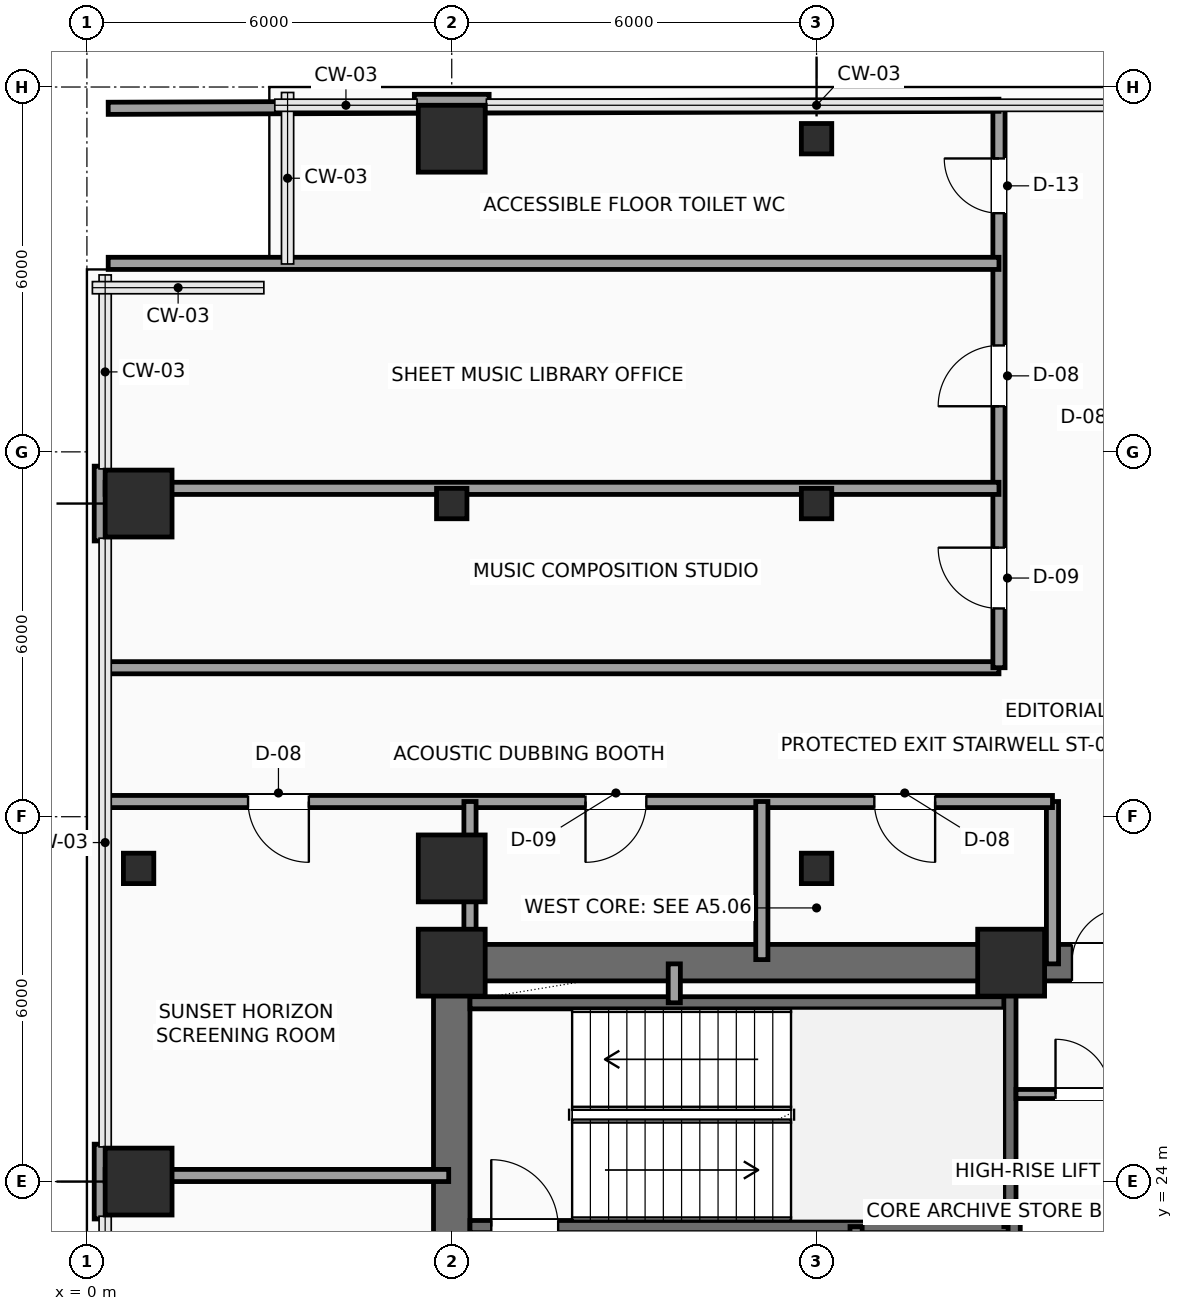
"""IFC4 building model, lengths in metres.
Left out: names, types, materials, properties, quantities, classifications, styles, units other than length and angle.
Written with IfcOpenShell. Run it as: python <this file> out.ifc"""

import sys

from ifc_helpers import new_model, si_unit, direction, frame, frame_2d, origin, origin_2d, place, context, subcontext, project, spatial, rectangle, hollow_rectangle, extrude, element, fill, save


model = new_model("IFC4")
c1 = context("Model", 3, precision=1e-05, world=origin(), true_north=direction((0.0, 1.0)))
c2 = subcontext(c1, "Body", "Model", "MODEL_VIEW")
j1 = project(units=[si_unit("LENGTHUNIT", "METRE"), si_unit("PLANEANGLEUNIT", "RADIAN")], contexts=[c1])
p1 = place(None, origin())
s1 = spatial("IfcSite", under=j1, at=p1, CompositionType="ELEMENT")
p2 = place(p1, origin())
s2 = spatial("IfcBuilding", under=s1, at=p2, CompositionType="ELEMENT")
p3 = place(p2, frame((0.0, 0.0, 115.65)))
s3 = spatial("IfcBuildingStorey", under=s2, at=p3, CompositionType="ELEMENT", Elevation=115.65)
for number, where, z_axis, x_axis in (
    (1, (6.0, 27.6, 0.0), (0.0, 0.0, 1.0), (1.0, 0.0, 0.0)),
    (2, (15.2, 27.6, 0.0), (0.0, 0.0, 1.0), (1.0, 0.0, 0.0)),
    (3, (0.85, 24.0, 0.0), (0.0, 0.0, 1.0), (1.0, 0.0, 0.0)),
):
    element("IfcColumn", number, at=place(p3, frame(where, z_axis=z_axis, x_axis=x_axis)), inside=s3, PredefinedType="COLUMN", context=c2, shape_type="SweptSolid", body=[
        extrude(rectangle(XDim=1.1, YDim=1.1, at=origin_2d()), origin(), (0.0, 0.0, 1.0), 3.75),
    ])
p4 = place(p3, frame((0.85, 29.15, 0.0), z_axis=(0.0, 0.0, 1.0), x_axis=(1.0, 0.0, 0.0)))
e4 = element("IfcColumn", 4, at=p4, inside=s3, PredefinedType="COLUMN", context=c2, shape_type="SweptSolid", body=[
    extrude(hollow_rectangle(XDim=0.5, YDim=0.5, WallThickness=0.025, InnerFilletRadius=0.025, OuterFilletRadius=0.04, at=origin_2d()), origin(), (0.0, 0.0, 1.0), 3.75),
])
for number, where, z_axis, x_axis in (
    (5, (0.85, 35.15, 0.0), (0.0, 0.0, 1.0), (1.0, 0.0, 0.0)),
    (6, (6.0, 29.15, 0.0), (0.0, 0.0, 1.0), (1.0, 0.0, 0.0)),
):
    element("IfcColumn", number, at=place(p3, frame(where, z_axis=z_axis, x_axis=x_axis)), inside=s3, PredefinedType="COLUMN", context=c2, shape_type="SweptSolid", body=[
        extrude(rectangle(XDim=1.1, YDim=1.1, at=origin_2d()), origin(), (0.0, 0.0, 1.0), 3.75),
    ])
p5 = place(p3, frame((6.0, 35.15, 0.0), z_axis=(0.0, 0.0, 1.0), x_axis=(1.0, 0.0, 0.0)))
e7 = element("IfcColumn", 7, at=p5, inside=s3, PredefinedType="COLUMN", context=c2, shape_type="SweptSolid", body=[
    extrude(hollow_rectangle(XDim=0.5, YDim=0.5, WallThickness=0.025, InnerFilletRadius=0.025, OuterFilletRadius=0.04, at=origin_2d()), origin(), (0.0, 0.0, 1.0), 3.75),
])
p6 = place(p3, frame((6.0, 41.15, 0.0), z_axis=(0.0, 0.0, 1.0), x_axis=(1.0, 0.0, 0.0)))
e8 = element("IfcColumn", 8, at=p6, inside=s3, PredefinedType="COLUMN", context=c2, shape_type="SweptSolid", body=[
    extrude(rectangle(XDim=1.1, YDim=1.1, at=origin_2d()), origin(), (0.0, 0.0, 1.0), 3.75),
])
for number, where, z_axis, x_axis in (
    (9, (12.0, 29.15, 0.0), (0.0, 0.0, 1.0), (1.0, 0.0, 0.0)),
    (10, (12.0, 35.15, 0.0), (0.0, 0.0, 1.0), (1.0, 0.0, 0.0)),
    (11, (12.0, 41.15, 0.0), (0.0, 0.0, 1.0), (1.0, 0.0, 0.0)),
):
    element("IfcColumn", number, at=place(p3, frame(where, z_axis=z_axis, x_axis=x_axis)), inside=s3, PredefinedType="COLUMN", context=c2, shape_type="SweptSolid", body=[
        extrude(hollow_rectangle(XDim=0.5, YDim=0.5, WallThickness=0.025, InnerFilletRadius=0.025, OuterFilletRadius=0.04, at=origin_2d()), origin(), (0.0, 0.0, 1.0), 3.75),
    ])
for number, where, z_axis, x_axis in (
    (12, (0.24, 23.385, 0.0), (0.0, 0.0, 1.0), (0.0, 1.0, 0.0)),
    (13, (0.24, 34.535, 0.0), (0.0, 0.0, 1.0), (0.0, 1.0, 0.0)),
    (14, (5.385, 41.76, 0.0), (0.0, 0.0, 1.0), (1.0, 0.0, 0.0)),
):
    element("IfcWall", number, at=place(p3, frame(where, z_axis=z_axis, x_axis=x_axis)), inside=s3, PredefinedType="SOLIDWALL", context=c2, shape_type="SweptSolid", body=[
        extrude(rectangle(XDim=1.23, YDim=0.24, at=frame_2d((0.615, 0.0))), origin(), (0.0, 0.0, 1.0), 3.525),
    ])
p7 = place(p3, frame((6.0, 27.6, 0.0), z_axis=(0.0, 0.0, 1.0), x_axis=(1.0, 0.0, 0.0)))
e15 = element("IfcWall", 15, at=p7, inside=s3, PredefinedType="SHEAR", context=c2, shape_type="SweptSolid", body=[
    extrude(rectangle(XDim=12.0, YDim=0.6, at=frame_2d((6.0, 0.0))), origin(), (0.0, 0.0, 1.0), 3.525),
])
p8 = place(p7, frame((10.2, 0.0, 0.0)))
e16 = element("IfcOpeningElement", 16, at=p8, cuts=e15, PredefinedType="OPENING", context=c2, shape_type="SweptSolid", body=[
    extrude(rectangle(XDim=0.9, YDim=2.15, at=frame_2d((0.45, 1.075))), frame((0.0, 0.31, 0.0), z_axis=(0.0, -1.0, 0.0), x_axis=(1.0, 0.0, 0.0)), (0.0, 0.0, 1.0), 0.62),
])
p9 = place(p3, frame((6.0, 18.0, 0.0), z_axis=(0.0, 0.0, 1.0), x_axis=(0.0, 1.0, 0.0)))
e17 = element("IfcWall", 17, at=p9, inside=s3, PredefinedType="SHEAR", context=c2, shape_type="SweptSolid", body=[
    extrude(rectangle(XDim=9.6, YDim=0.6, at=frame_2d((4.8, 0.0))), origin(), (0.0, 0.0, 1.0), 3.525),
])
p10 = place(p3, frame((6.3, 23.26, 0.0), z_axis=(0.0, 0.0, 1.0), x_axis=(1.0, 0.0, 0.0)))
e18 = element("IfcWall", 18, at=p10, inside=s3, PredefinedType="SHEAR", context=c2, shape_type="SweptSolid", body=[
    extrude(rectangle(XDim=8.88, YDim=0.2, at=frame_2d((4.44, 0.0))), origin(), (0.0, 0.0, 1.0), 3.525),
])
p11 = place(p10, frame((0.35, 0.0, 0.0)))
e19 = element("IfcOpeningElement", 19, at=p11, cuts=e18, PredefinedType="OPENING", context=c2, shape_type="SweptSolid", body=[
    extrude(rectangle(XDim=1.1, YDim=2.2, at=frame_2d((0.55, 1.1))), frame((0.0, 0.11, 0.0), z_axis=(0.0, -1.0, 0.0), x_axis=(1.0, 0.0, 0.0)), (0.0, 0.0, 1.0), 0.22),
])
p12 = place(p3, frame((6.3, 26.94, 0.0), z_axis=(0.0, 0.0, 1.0), x_axis=(1.0, 0.0, 0.0)))
e20 = element("IfcWall", 20, at=p12, inside=s3, PredefinedType="SHEAR", context=c2, shape_type="SweptSolid", body=[
    extrude(rectangle(XDim=8.88, YDim=0.2, at=frame_2d((4.44, 0.0))), origin(), (0.0, 0.0, 1.0), 3.525),
])
p13 = place(p3, frame((15.18, 23.26, 0.0), z_axis=(0.0, 0.0, 1.0), x_axis=(0.0, 1.0, 0.0)))
e21 = element("IfcWall", 21, at=p13, inside=s3, PredefinedType="SHEAR", context=c2, shape_type="SweptSolid", body=[
    extrude(rectangle(XDim=4.04, YDim=0.2, at=frame_2d((2.02, 0.0))), origin(), (0.0, 0.0, 1.0), 3.525),
])
p14 = place(p3, frame((12.65, 20.42, 0.0), z_axis=(0.0, 0.0, 1.0), x_axis=(0.0, 1.0, 0.0)))
e22 = element("IfcWall", 22, at=p14, inside=s3, PredefinedType="SHEAR", context=c2, shape_type="SweptSolid", body=[
    extrude(rectangle(XDim=2.84, YDim=0.2, at=frame_2d((1.42, 0.0))), origin(), (0.0, 0.0, 1.0), 3.525),
])
p15 = place(p14, frame((0.9, 0.0, 0.0)))
e23 = element("IfcOpeningElement", 23, at=p15, cuts=e22, PredefinedType="OPENING", context=c2, shape_type="SweptSolid", body=[
    extrude(rectangle(XDim=0.9, YDim=2.15, at=frame_2d((0.45, 1.075))), frame((0.0, 0.11, 0.0), z_axis=(0.0, -1.0, 0.0), x_axis=(1.0, 0.0, 0.0)), (0.0, 0.0, 1.0), 0.22),
])
p16 = place(p3, frame((9.66, 26.94, 0.0), z_axis=(0.0, 0.0, 1.0), x_axis=(0.0, 1.0, 0.0)))
e24 = element("IfcWall", 24, at=p16, inside=s3, PredefinedType="SOLIDWALL", context=c2, shape_type="SweptSolid", body=[
    extrude(rectangle(XDim=0.64, YDim=0.2, at=frame_2d((0.32, 0.0))), origin(), (0.0, 0.0, 1.0), 3.525),
])
p17 = place(p3, frame((15.25, 18.25, 0.0), z_axis=(0.0, 0.0, 1.0), x_axis=(0.0, 1.0, 0.0)))
e25 = element("IfcWall", 25, at=p17, inside=s3, PredefinedType="SHEAR", context=c2, shape_type="SweptSolid", body=[
    extrude(rectangle(XDim=5.2, YDim=0.2, at=frame_2d((2.6, 0.0))), origin(), (0.0, 0.0, 1.0), 3.525),
])
p18 = place(p3, frame((15.25, 23.45, 0.0), z_axis=(0.0, 0.0, 1.0), x_axis=(1.0, 0.0, 0.0)))
e26 = element("IfcWall", 26, at=p18, inside=s3, PredefinedType="SHEAR", context=c2, shape_type="SweptSolid", body=[
    extrude(rectangle(XDim=2.45, YDim=0.2, at=frame_2d((1.225, 0.0))), origin(), (0.0, 0.0, 1.0), 3.525),
])
p19 = place(p3, frame((15.28, 25.44, 0.0), z_axis=(0.0, 0.0, 1.0), x_axis=(1.0, 0.0, 0.0)))
e27 = element("IfcWall", 27, at=p19, inside=s3, PredefinedType="PARTITIONING", context=c2, shape_type="SweptSolid", body=[
    extrude(rectangle(XDim=2.42, YDim=0.15, at=frame_2d((1.21, 0.0))), origin(), (0.0, 0.0, 1.0), 3.525),
])
p20 = place(p19, frame((0.65, 0.0, 0.0)))
e28 = element("IfcOpeningElement", 28, at=p20, cuts=e27, PredefinedType="OPENING", context=c2, shape_type="SweptSolid", body=[
    extrude(rectangle(XDim=0.9, YDim=2.15, at=frame_2d((0.45, 1.075))), frame((0.0, 0.085, 0.0), z_axis=(0.0, -1.0, 0.0), x_axis=(1.0, 0.0, 0.0)), (0.0, 0.0, 1.0), 0.17),
])
p21 = place(p3, frame((15.88, 27.58, 0.0), z_axis=(0.0, 0.0, 1.0), x_axis=(0.0, 1.0, 0.0)))
e29 = element("IfcWall", 29, at=p21, inside=s3, PredefinedType="SOLIDWALL", context=c2, shape_type="SweptSolid", body=[
    extrude(rectangle(XDim=2.67, YDim=0.2, at=frame_2d((1.335, 0.0))), origin(), (0.0, 0.0, 1.0), 3.525),
])
p22 = place(p3, frame((15.88, 30.25, 0.0), z_axis=(0.0, 0.0, 1.0), x_axis=(-1.0, 0.0, 0.0)))
e30 = element("IfcWall", 30, at=p22, inside=s3, PredefinedType="SOLIDWALL", context=c2, shape_type="SweptSolid", body=[
    extrude(rectangle(XDim=15.58, YDim=0.2, at=frame_2d((7.79, 0.0))), origin(), (0.0, 0.0, 1.0), 3.525),
])
p23 = place(p22, frame((12.23, 0.0, 0.0)))
e31 = element("IfcOpeningElement", 31, at=p23, cuts=e30, PredefinedType="OPENING", context=c2, shape_type="SweptSolid", body=[
    extrude(rectangle(XDim=1.0, YDim=2.2, at=frame_2d((0.5, 1.1))), frame((0.0, 0.11, 0.0), z_axis=(0.0, -1.0, 0.0), x_axis=(1.0, 0.0, 0.0)), (0.0, 0.0, 1.0), 0.22),
])
p24 = place(p22, frame((6.68, 0.0, 0.0)))
e32 = element("IfcOpeningElement", 32, at=p24, cuts=e30, PredefinedType="OPENING", context=c2, shape_type="SweptSolid", body=[
    extrude(rectangle(XDim=1.0, YDim=2.2, at=frame_2d((0.5, 1.1))), frame((0.0, 0.11, 0.0), z_axis=(0.0, -1.0, 0.0), x_axis=(1.0, 0.0, 0.0)), (0.0, 0.0, 1.0), 0.22),
])
p25 = place(p22, frame((1.93, 0.0, 0.0)))
e33 = element("IfcOpeningElement", 33, at=p25, cuts=e30, PredefinedType="OPENING", context=c2, shape_type="SweptSolid", body=[
    extrude(rectangle(XDim=1.0, YDim=2.2, at=frame_2d((0.5, 1.1))), frame((0.0, 0.11, 0.0), z_axis=(0.0, -1.0, 0.0), x_axis=(1.0, 0.0, 0.0)), (0.0, 0.0, 1.0), 0.22),
])
p26 = place(p3, frame((0.3, 32.45, 0.0), z_axis=(0.0, 0.0, 1.0), x_axis=(1.0, 0.0, 0.0)))
e34 = element("IfcWall", 34, at=p26, inside=s3, PredefinedType="SOLIDWALL", context=c2, shape_type="SweptSolid", body=[
    extrude(rectangle(XDim=14.7, YDim=0.2, at=frame_2d((7.35, 0.0))), origin(), (0.0, 0.0, 1.0), 3.525),
])
p27 = place(p3, frame((15.0, 32.45, 0.0), z_axis=(0.0, 0.0, 1.0), x_axis=(0.0, 1.0, 0.0)))
e35 = element("IfcWall", 35, at=p27, inside=s3, PredefinedType="SOLIDWALL", context=c2, shape_type="SweptSolid", body=[
    extrude(rectangle(XDim=9.25, YDim=0.2, at=frame_2d((4.625, 0.0))), origin(), (0.0, 0.0, 1.0), 3.525),
])
p28 = place(p27, frame((0.975, 0.0, 0.0)))
e36 = element("IfcOpeningElement", 36, at=p28, cuts=e35, PredefinedType="OPENING", context=c2, shape_type="SweptSolid", body=[
    extrude(rectangle(XDim=1.0, YDim=2.2, at=frame_2d((0.5, 1.1))), frame((0.0, 0.11, 0.0), z_axis=(0.0, -1.0, 0.0), x_axis=(1.0, 0.0, 0.0)), (0.0, 0.0, 1.0), 0.22),
])
p29 = place(p27, frame((4.3, 0.0, 0.0)))
e37 = element("IfcOpeningElement", 37, at=p29, cuts=e35, PredefinedType="OPENING", context=c2, shape_type="SweptSolid", body=[
    extrude(rectangle(XDim=1.0, YDim=2.2, at=frame_2d((0.5, 1.1))), frame((0.0, 0.11, 0.0), z_axis=(0.0, -1.0, 0.0), x_axis=(1.0, 0.0, 0.0)), (0.0, 0.0, 1.0), 0.22),
])
p30 = place(p27, frame((7.475, 0.0, 0.0)))
e38 = element("IfcOpeningElement", 38, at=p30, cuts=e35, PredefinedType="OPENING", context=c2, shape_type="SweptSolid", body=[
    extrude(rectangle(XDim=0.9, YDim=2.1, at=frame_2d((0.45, 1.05))), frame((0.0, 0.11, 0.0), z_axis=(0.0, -1.0, 0.0), x_axis=(1.0, 0.0, 0.0)), (0.0, 0.0, 1.0), 0.22),
])
p31 = place(p3, frame((0.3, 24.1, 0.0), z_axis=(0.0, 0.0, 1.0), x_axis=(1.0, 0.0, 0.0)))
e39 = element("IfcWall", 39, at=p31, inside=s3, PredefinedType="PARTITIONING", context=c2, shape_type="SweptSolid", body=[
    extrude(rectangle(XDim=5.65, YDim=0.2, at=frame_2d((2.825, 0.0))), origin(), (0.0, 0.0, 1.0), 3.525),
])
p32 = place(p3, frame((6.3, 27.65, 0.0), z_axis=(0.0, 0.0, 1.0), x_axis=(0.0, 1.0, 0.0)))
e40 = element("IfcWall", 40, at=p32, inside=s3, PredefinedType="PARTITIONING", context=c2, shape_type="SweptSolid", body=[
    extrude(rectangle(XDim=2.6, YDim=0.2, at=frame_2d((1.3, 0.0))), origin(), (0.0, 0.0, 1.0), 3.017),
])
p33 = place(p3, frame((11.1, 27.65, 0.0), z_axis=(0.0, 0.0, 1.0), x_axis=(0.0, 1.0, 0.0)))
e41 = element("IfcWall", 41, at=p33, inside=s3, PredefinedType="PARTITIONING", context=c2, shape_type="SweptSolid", body=[
    extrude(rectangle(XDim=2.6, YDim=0.2, at=frame_2d((1.3, 0.0))), origin(), (0.0, 0.0, 1.0), 3.525),
])
p34 = place(p3, frame((0.3, 35.4, 0.0), z_axis=(0.0, 0.0, 1.0), x_axis=(1.0, 0.0, 0.0)))
e42 = element("IfcWall", 42, at=p34, inside=s3, PredefinedType="PARTITIONING", context=c2, shape_type="SweptSolid", body=[
    extrude(rectangle(XDim=14.7, YDim=0.2, at=frame_2d((7.35, 0.0))), origin(), (0.0, 0.0, 1.0), 3.017),
])
p35 = place(p3, frame((0.35, 39.1, 0.0), z_axis=(0.0, 0.0, 1.0), x_axis=(1.0, 0.0, 0.0)))
e43 = element("IfcWall", 43, at=p35, inside=s3, PredefinedType="PARTITIONING", context=c2, shape_type="SweptSolid", body=[
    extrude(rectangle(XDim=14.65, YDim=0.2, at=frame_2d((7.325, 0.0))), origin(), (0.0, 0.0, 1.0), 3.525),
])
p36 = place(p3, frame((0.35, 41.65, 0.0), z_axis=(0.0, 0.0, 1.0), x_axis=(0.999994073761, 0.003442737683, 0.0)))
e44 = element("IfcWall", 44, at=p36, inside=s3, PredefinedType="PARTITIONING", context=c2, shape_type="SweptSolid", body=[
    extrude(rectangle(XDim=5.035, YDim=0.2, at=frame_2d((2.518, 0.0))), origin(), (0.0, 0.0, 1.0), 3.525),
])
p37 = place(p3, frame((6.615, 41.671, 0.0), z_axis=(0.0, 0.0, 1.0), x_axis=(0.999994197557, 0.003406589638, 0.0)))
e45 = element("IfcWall", 45, at=p37, inside=s3, PredefinedType="PARTITIONING", context=c2, shape_type="SweptSolid", body=[
    extrude(rectangle(XDim=8.385, YDim=0.2, at=frame_2d((4.192, 0.0))), origin(), (0.0, 0.0, 1.0), 3.525),
])
p38 = place(p8, origin())
e46 = element("IfcDoor", 46, at=p38, inside=s3, OperationType="SINGLE_SWING_RIGHT", PredefinedType="DOOR", context=c2, shape_type="SweptSolid", body=[
    extrude(rectangle(XDim=0.9, YDim=2.15, at=frame_2d((0.45, 1.075))), frame((0.0, 0.025, 0.0), z_axis=(0.0, -1.0, 0.0), x_axis=(1.0, 0.0, 0.0)), (0.0, 0.0, 1.0), 0.05),
])
fill(e16, e46)
p39 = place(p11, origin())
e47 = element("IfcDoor", 47, at=p39, inside=s3, OperationType="SINGLE_SWING_LEFT", PredefinedType="DOOR", context=c2, shape_type="SweptSolid", body=[
    extrude(rectangle(XDim=1.1, YDim=2.2, at=frame_2d((0.55, 1.1))), frame((0.0, 0.025, 0.0), z_axis=(0.0, -1.0, 0.0), x_axis=(1.0, 0.0, 0.0)), (0.0, 0.0, 1.0), 0.05),
])
fill(e19, e47)
p40 = place(p20, origin())
e48 = element("IfcDoor", 48, at=p40, inside=s3, OperationType="SINGLE_SWING_LEFT", PredefinedType="DOOR", context=c2, shape_type="SweptSolid", body=[
    extrude(rectangle(XDim=0.9, YDim=2.15, at=frame_2d((0.45, 1.075))), frame((0.0, 0.025, 0.0), z_axis=(0.0, -1.0, 0.0), x_axis=(1.0, 0.0, 0.0)), (0.0, 0.0, 1.0), 0.05),
])
fill(e28, e48)
p41 = place(p23, origin())
e49 = element("IfcDoor", 49, at=p41, inside=s3, OperationType="SINGLE_SWING_LEFT", PredefinedType="DOOR", context=c2, shape_type="SweptSolid", body=[
    extrude(rectangle(XDim=1.0, YDim=2.2, at=frame_2d((0.5, 1.1))), frame((0.0, 0.025, 0.0), z_axis=(0.0, -1.0, 0.0), x_axis=(1.0, 0.0, 0.0)), (0.0, 0.0, 1.0), 0.05),
])
fill(e31, e49)
p42 = place(p24, origin())
e50 = element("IfcDoor", 50, at=p42, inside=s3, OperationType="SINGLE_SWING_RIGHT", PredefinedType="DOOR", context=c2, shape_type="SweptSolid", body=[
    extrude(rectangle(XDim=1.0, YDim=2.2, at=frame_2d((0.5, 1.1))), frame((0.0, 0.025, 0.0), z_axis=(0.0, -1.0, 0.0), x_axis=(1.0, 0.0, 0.0)), (0.0, 0.0, 1.0), 0.05),
])
fill(e32, e50)
p43 = place(p25, origin())
e51 = element("IfcDoor", 51, at=p43, inside=s3, OperationType="SINGLE_SWING_LEFT", PredefinedType="DOOR", context=c2, shape_type="SweptSolid", body=[
    extrude(rectangle(XDim=1.0, YDim=2.2, at=frame_2d((0.5, 1.1))), frame((0.0, 0.025, 0.0), z_axis=(0.0, -1.0, 0.0), x_axis=(1.0, 0.0, 0.0)), (0.0, 0.0, 1.0), 0.05),
])
fill(e33, e51)
p44 = place(p28, origin())
e52 = element("IfcDoor", 52, at=p44, inside=s3, OperationType="SINGLE_SWING_RIGHT", PredefinedType="DOOR", context=c2, shape_type="SweptSolid", body=[
    extrude(rectangle(XDim=1.0, YDim=2.2, at=frame_2d((0.5, 1.1))), frame((0.0, 0.025, 0.0), z_axis=(0.0, -1.0, 0.0), x_axis=(1.0, 0.0, 0.0)), (0.0, 0.0, 1.0), 0.05),
])
fill(e36, e52)
p45 = place(p29, origin())
e53 = element("IfcDoor", 53, at=p45, inside=s3, OperationType="SINGLE_SWING_LEFT", PredefinedType="DOOR", context=c2, shape_type="SweptSolid", body=[
    extrude(rectangle(XDim=1.0, YDim=2.2, at=frame_2d((0.5, 1.1))), frame((0.0, 0.025, 0.0), z_axis=(0.0, -1.0, 0.0), x_axis=(1.0, 0.0, 0.0)), (0.0, 0.0, 1.0), 0.05),
])
fill(e37, e53)
p46 = place(p30, origin())
e54 = element("IfcDoor", 54, at=p46, inside=s3, OperationType="SINGLE_SWING_RIGHT", PredefinedType="DOOR", context=c2, shape_type="SweptSolid", body=[
    extrude(rectangle(XDim=0.9, YDim=2.1, at=frame_2d((0.45, 1.05))), frame((0.0, 0.025, 0.0), z_axis=(0.0, -1.0, 0.0), x_axis=(1.0, 0.0, 0.0)), (0.0, 0.0, 1.0), 0.05),
])
fill(e38, e54)
save(model, sys.argv[1])
